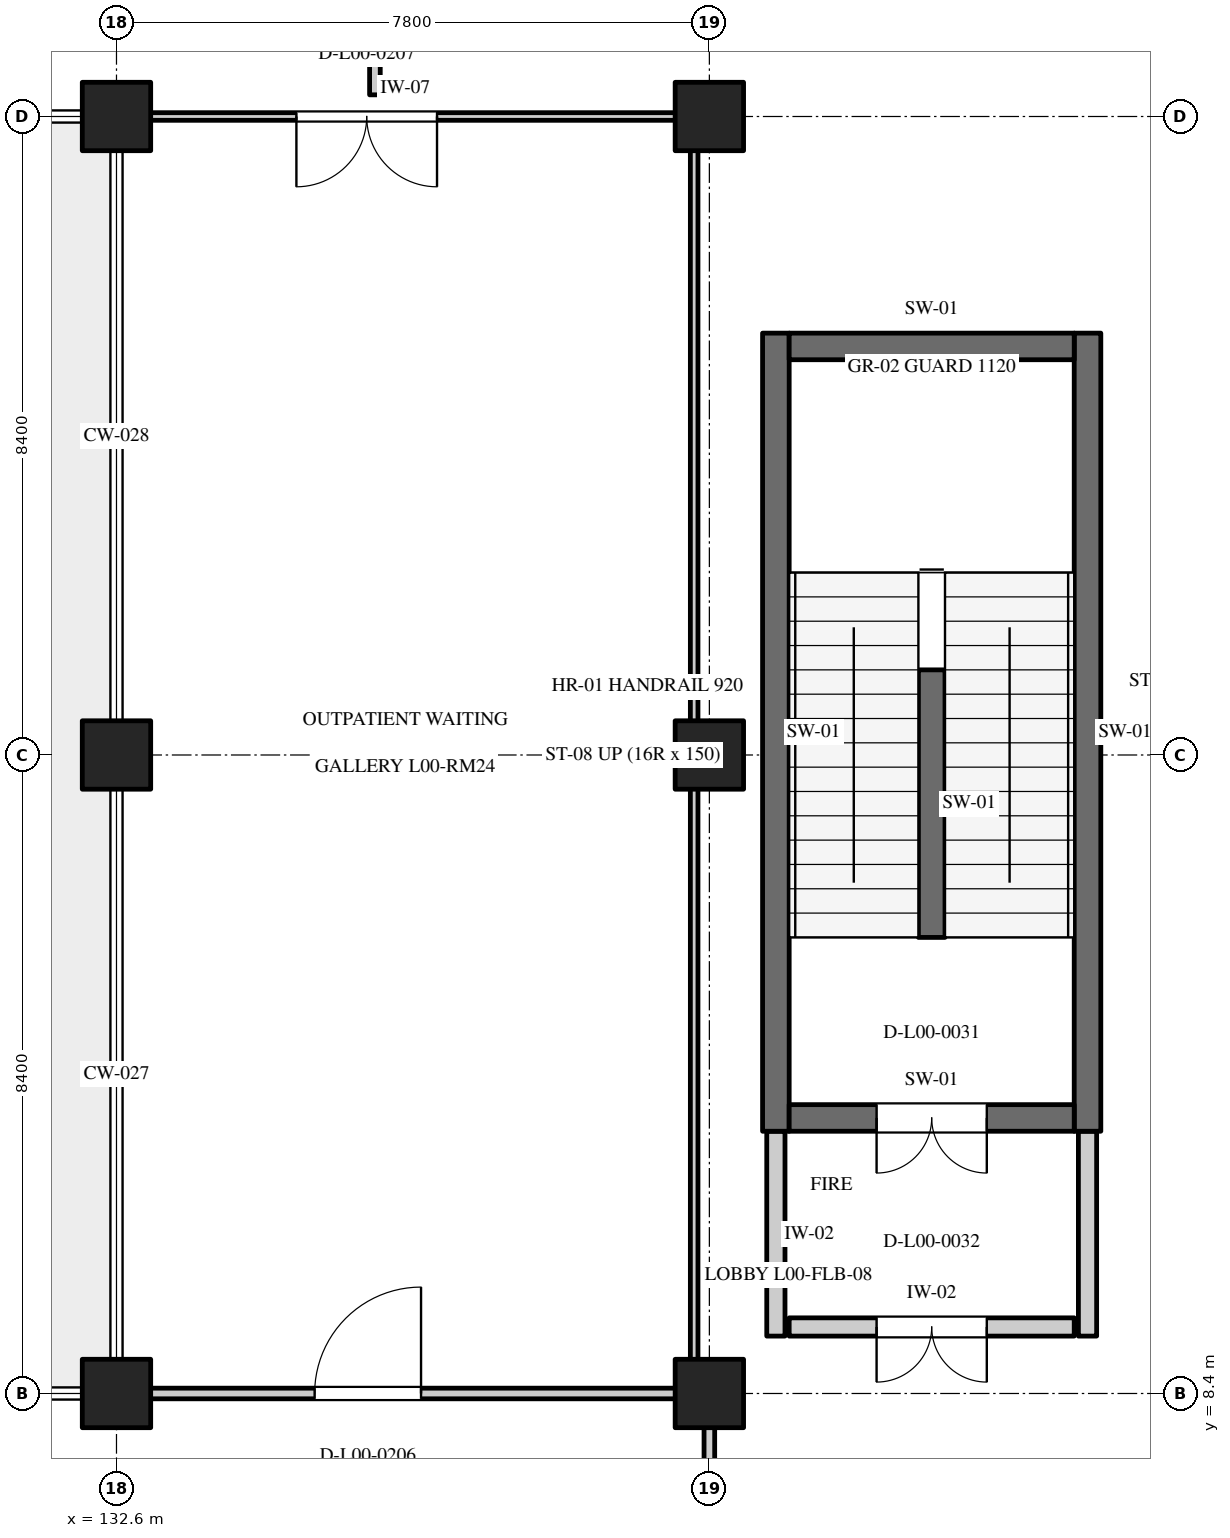
"""IFC4 building model, lengths in metres.
Left out: names, types, materials, properties, quantities, classifications, styles, units other than length and angle.
Written with IfcOpenShell. Run it as: python <this file> out.ifc"""

import sys

from ifc_helpers import new_model, si_unit, direction, frame, frame_2d, origin, origin_2d, place, context, subcontext, project, spatial, rectangle, extrude, element, fill, save


model = new_model("IFC4")
c1 = context("Model", 3, precision=1e-05, world=origin(), true_north=direction((0.0, 1.0)))
c2 = subcontext(c1, "Body", "Model", "MODEL_VIEW")
j1 = project(units=[si_unit("LENGTHUNIT", "METRE"), si_unit("PLANEANGLEUNIT", "RADIAN")], contexts=[c1])
p1 = place(None, origin())
s1 = spatial("IfcSite", under=j1, at=p1, CompositionType="ELEMENT")
p2 = place(p1, origin())
s2 = spatial("IfcBuilding", under=s1, at=p2, CompositionType="ELEMENT")
p3 = place(p2, origin())
s3 = spatial("IfcBuildingStorey", under=s2, at=p3, CompositionType="ELEMENT", Elevation=0.0)
for number, where, z_axis, x_axis in (
    (1, (132.6, 8.4, 0.0), (0.0, 0.0, 1.0), (1.0, 0.0, 0.0)),
    (2, (132.6, 16.8, 0.0), (0.0, 0.0, 1.0), (1.0, 0.0, 0.0)),
    (3, (132.6, 25.2, 0.0), (0.0, 0.0, 1.0), (1.0, 0.0, 0.0)),
    (4, (140.4, 8.4, 0.0), (0.0, 0.0, 1.0), (1.0, 0.0, 0.0)),
    (5, (140.4, 16.8, 0.0), (0.0, 0.0, 1.0), (1.0, 0.0, 0.0)),
    (6, (140.4, 25.2, 0.0), (0.0, 0.0, 1.0), (1.0, 0.0, 0.0)),
):
    element("IfcColumn", number, at=place(p3, frame(where, z_axis=z_axis, x_axis=x_axis)), inside=s3, PredefinedType="COLUMN", context=c2, shape_type="SweptSolid", body=[
        extrude(rectangle(XDim=0.9, YDim=0.9, at=origin_2d()), origin(), (0.0, 0.0, 1.0), 4.8),
    ])
for number, where, z_axis, x_axis in (
    (7, (141.275, 11.85, 0.0), (0.0, 0.0, 1.0), (0.0, 1.0, 0.0)),
    (8, (145.375, 11.85, 0.0), (0.0, 0.0, 1.0), (0.0, 1.0, 0.0)),
):
    element("IfcWall", number, at=place(p3, frame(where, z_axis=z_axis, x_axis=x_axis)), inside=s3, PredefinedType="SHEAR", context=c2, shape_type="SweptSolid", body=[
        extrude(rectangle(XDim=10.5, YDim=0.35, at=frame_2d((5.25, 0.0))), origin(), (0.0, 0.0, 1.0), 4.8),
    ])
p4 = place(p3, frame((141.45, 22.175, 0.0), z_axis=(0.0, 0.0, 1.0), x_axis=(1.0, 0.0, 0.0)))
e9 = element("IfcWall", 9, at=p4, inside=s3, PredefinedType="SHEAR", context=c2, shape_type="SweptSolid", body=[
    extrude(rectangle(XDim=3.75, YDim=0.35, at=frame_2d((1.875, 0.0))), origin(), (0.0, 0.0, 1.0), 4.8),
])
p5 = place(p3, frame((141.45, 12.025, 0.0), z_axis=(0.0, 0.0, 1.0), x_axis=(1.0, 0.0, 0.0)))
e10 = element("IfcWall", 10, at=p5, inside=s3, PredefinedType="SHEAR", context=c2, shape_type="SweptSolid", body=[
    extrude(rectangle(XDim=3.75, YDim=0.35, at=frame_2d((1.875, 0.0))), origin(), (0.0, 0.0, 1.0), 4.45),
])
p6 = place(p5, frame((1.15, 0.0, 0.0)))
e11 = element("IfcOpeningElement", 11, at=p6, cuts=e10, PredefinedType="OPENING", context=c2, shape_type="SweptSolid", body=[
    extrude(rectangle(XDim=1.45, YDim=2.2, at=frame_2d((0.725, 1.1))), frame((0.0, 0.187, 0.0), z_axis=(0.0, -1.0, 0.0), x_axis=(1.0, 0.0, 0.0)), (0.0, 0.0, 1.0), 0.374),
])
for number, where, z_axis, x_axis in (
    (12, (141.275, 9.155, 0.0), (0.0, 0.0, 1.0), (0.0, 1.0, 0.0)),
    (13, (145.375, 9.155, 0.0), (0.0, 0.0, 1.0), (0.0, 1.0, 0.0)),
):
    element("IfcWall", number, at=place(p3, frame(where, z_axis=z_axis, x_axis=x_axis)), inside=s3, PredefinedType="STANDARD", context=c2, shape_type="SweptSolid", body=[
        extrude(rectangle(XDim=2.695, YDim=0.24, at=frame_2d((1.348, 0.0))), origin(), (0.0, 0.0, 1.0), 4.45),
    ])
p7 = place(p3, frame((141.45, 9.275, 0.0), z_axis=(0.0, 0.0, 1.0), x_axis=(1.0, 0.0, 0.0)))
e14 = element("IfcWall", 14, at=p7, inside=s3, PredefinedType="STANDARD", context=c2, shape_type="SweptSolid", body=[
    extrude(rectangle(XDim=3.75, YDim=0.24, at=frame_2d((1.875, 0.0))), origin(), (0.0, 0.0, 1.0), 4.45),
])
p8 = place(p7, frame((1.15, 0.0, 0.0)))
e15 = element("IfcOpeningElement", 15, at=p8, cuts=e14, PredefinedType="OPENING", context=c2, shape_type="SweptSolid", body=[
    extrude(rectangle(XDim=1.45, YDim=2.2, at=frame_2d((0.725, 1.1))), frame((0.0, 0.132, 0.0), z_axis=(0.0, -1.0, 0.0), x_axis=(1.0, 0.0, 0.0)), (0.0, 0.0, 1.0), 0.264),
])
p9 = place(p3, frame((143.325, 14.4, 0.0), z_axis=(0.0, 0.0, 1.0), x_axis=(0.0, 1.0, 0.0)))
e16 = element("IfcWall", 16, at=p9, inside=s3, PredefinedType="SHEAR", context=c2, shape_type="SweptSolid", body=[
    extrude(rectangle(XDim=3.52, YDim=0.35, at=frame_2d((1.76, 0.0))), origin(), (0.0, 0.0, 1.0), 4.8),
])
p10 = place(p3, frame((132.19, 8.4, 0.0), z_axis=(0.0, 0.0, 1.0), x_axis=(1.0, 0.0, 0.0)))
e17 = element("IfcWall", 17, at=p10, inside=s3, PredefinedType="PARTITIONING", context=c2, shape_type="SweptSolid", body=[
    extrude(rectangle(XDim=8.125, YDim=0.14, at=frame_2d((4.062, 0.0))), origin(), (0.0, 0.0, 1.0), 4.43),
])
p11 = place(p10, frame((3.017, 0.0, 0.0)))
e18 = element("IfcOpeningElement", 18, at=p11, cuts=e17, PredefinedType="OPENING", context=c2, shape_type="SweptSolid", body=[
    extrude(rectangle(XDim=1.4, YDim=2.25, at=frame_2d((0.7, 1.125))), frame((0.0, 0.082, 0.0), z_axis=(0.0, -1.0, 0.0), x_axis=(1.0, 0.0, 0.0)), (0.0, 0.0, 1.0), 0.164),
])
p12 = place(p3, frame((140.4, 0.085, 0.0), z_axis=(0.0, 0.0, 1.0), x_axis=(0.0, 1.0, 0.0)))
e19 = element("IfcWall", 19, at=p12, inside=s3, PredefinedType="PARTITIONING", context=c2, shape_type="SweptSolid", body=[
    extrude(rectangle(XDim=8.23, YDim=0.14, at=frame_2d((4.115, 0.0))), origin(), (0.0, 0.0, 1.0), 4.43),
])
p13 = place(p3, frame((132.685, 25.2, 0.0), z_axis=(0.0, 0.0, 1.0), x_axis=(1.0, 0.0, 0.0)))
e20 = element("IfcWall", 20, at=p13, inside=s3, PredefinedType="PARTITIONING", context=c2, shape_type="SweptSolid", body=[
    extrude(rectangle(XDim=7.43, YDim=0.1, at=frame_2d((3.715, 0.0))), origin(), (0.0, 0.0, 1.0), 3.7),
])
p14 = place(p13, frame((2.282, 0.0, 0.0)))
e21 = element("IfcOpeningElement", 21, at=p14, cuts=e20, PredefinedType="OPENING", context=c2, shape_type="SweptSolid", body=[
    extrude(rectangle(XDim=1.85, YDim=2.3, at=frame_2d((0.925, 1.15))), frame((0.0, 0.062, 0.0), z_axis=(0.0, -1.0, 0.0), x_axis=(1.0, 0.0, 0.0)), (0.0, 0.0, 1.0), 0.124),
])
p15 = place(p3, frame((132.6, 16.39, 0.0), z_axis=(0.0, 0.0, 1.0), x_axis=(0.0, 1.0, 0.0)))
e22 = element("IfcWall", 22, at=p15, inside=s3, PredefinedType="PARTITIONING", context=c2, shape_type="SweptSolid", body=[
    extrude(rectangle(XDim=0.82, YDim=0.1, at=frame_2d((0.41, 0.0))), origin(), (0.0, 0.0, 1.0), 3.7),
])
p16 = place(p3, frame((140.2, 8.485, 0.0), z_axis=(0.0, 0.0, 1.0), x_axis=(0.0, 1.0, 0.0)))
e23 = element("IfcWall", 23, at=p16, inside=s3, PredefinedType="PARTITIONING", context=c2, shape_type="SweptSolid", body=[
    extrude(rectangle(XDim=16.63, YDim=0.1, at=frame_2d((8.315, 0.0))), origin(), (0.0, 0.0, 1.0), 4.43),
])
p17 = place(p3, frame((132.19, 25.4, 0.0), z_axis=(0.0, 0.0, 1.0), x_axis=(1.0, 0.0, 0.0)))
e24 = element("IfcWall", 24, at=p17, inside=s3, PredefinedType="PARTITIONING", context=c2, shape_type="SweptSolid", body=[
    extrude(rectangle(XDim=0.455, YDim=0.14, at=frame_2d((0.228, 0.0))), origin(), (0.0, 0.0, 1.0), 3.7),
])
p18 = place(p3, frame((136.0, 25.485, 0.0), z_axis=(0.0, 0.0, 1.0), x_axis=(0.0, 1.0, 0.0)))
e25 = element("IfcWall", 25, at=p18, inside=s3, PredefinedType="PARTITIONING", context=c2, shape_type="SweptSolid", body=[
    extrude(rectangle(XDim=8.03, YDim=0.14, at=frame_2d((4.015, 0.0))), origin(), (0.0, 0.0, 1.0), 4.43),
])
p19 = place(p6, frame((1.45, 0.0, 0.0), z_axis=(0.0, 0.0, 1.0), x_axis=(-1.0, 0.0, 0.0)))
e26 = element("IfcDoor", 26, at=p19, inside=s3, OperationType="DOUBLE_DOOR_SINGLE_SWING", PredefinedType="DOOR", context=c2, shape_type="SweptSolid", body=[
    extrude(rectangle(XDim=1.45, YDim=2.2, at=frame_2d((0.725, 1.1))), frame((0.0, 0.025, 0.0), z_axis=(0.0, -1.0, 0.0), x_axis=(1.0, 0.0, 0.0)), (0.0, 0.0, 1.0), 0.05),
])
fill(e11, e26)
p20 = place(p8, frame((1.45, 0.0, 0.0), z_axis=(0.0, 0.0, 1.0), x_axis=(-1.0, 0.0, 0.0)))
e27 = element("IfcDoor", 27, at=p20, inside=s3, OperationType="DOUBLE_DOOR_SINGLE_SWING", PredefinedType="DOOR", context=c2, shape_type="SweptSolid", body=[
    extrude(rectangle(XDim=1.45, YDim=2.2, at=frame_2d((0.725, 1.1))), frame((0.0, 0.025, 0.0), z_axis=(0.0, -1.0, 0.0), x_axis=(1.0, 0.0, 0.0)), (0.0, 0.0, 1.0), 0.05),
])
fill(e15, e27)
p21 = place(p11, frame((1.4, 0.0, 0.0), z_axis=(0.0, 0.0, 1.0), x_axis=(-1.0, 0.0, 0.0)))
e28 = element("IfcDoor", 28, at=p21, inside=s3, OperationType="SINGLE_SWING_LEFT", PredefinedType="DOOR", context=c2, shape_type="SweptSolid", body=[
    extrude(rectangle(XDim=1.4, YDim=2.25, at=frame_2d((0.7, 1.125))), frame((0.0, 0.025, 0.0), z_axis=(0.0, -1.0, 0.0), x_axis=(1.0, 0.0, 0.0)), (0.0, 0.0, 1.0), 0.05),
])
fill(e18, e28)
p22 = place(p14, frame((1.85, 0.0, 0.0), z_axis=(0.0, 0.0, 1.0), x_axis=(-1.0, 0.0, 0.0)))
e29 = element("IfcDoor", 29, at=p22, inside=s3, OperationType="DOUBLE_DOOR_SINGLE_SWING", PredefinedType="DOOR", context=c2, shape_type="SweptSolid", body=[
    extrude(rectangle(XDim=1.85, YDim=2.3, at=frame_2d((0.925, 1.15))), frame((0.0, 0.025, 0.0), z_axis=(0.0, -1.0, 0.0), x_axis=(1.0, 0.0, 0.0)), (0.0, 0.0, 1.0), 0.05),
])
fill(e21, e29)
save(model, sys.argv[1])
